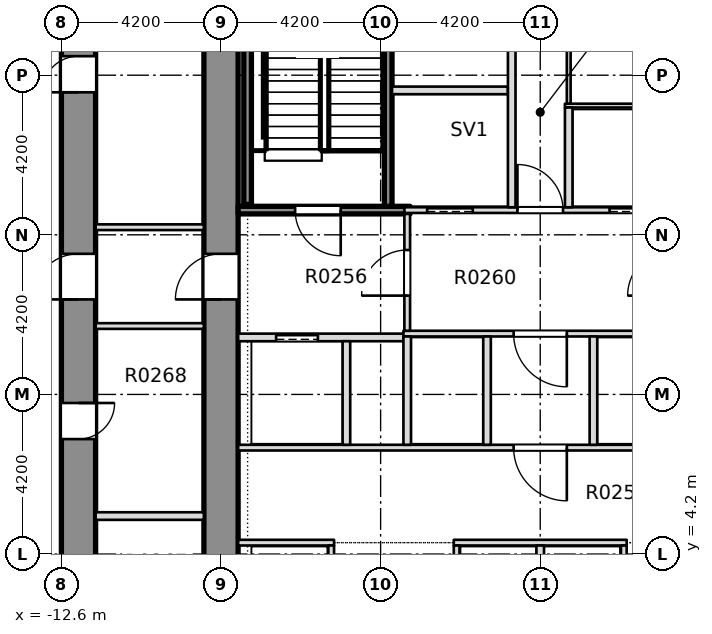
"""IFC4 building model, lengths in metres.
Left out: names, types, materials, properties, quantities, classifications, styles, units other than length and angle.
Written with IfcOpenShell. Run it as: python <this file> out.ifc"""

import sys

from ifc_helpers import new_model, si_unit, direction, frame, frame_2d, origin, place, context, subcontext, project, spatial, rectangle, extrude, element, fill, save


model = new_model("IFC4")
c1 = context("Model", 3, precision=1e-05, world=origin(), true_north=direction((0.0, 1.0)))
c2 = subcontext(c1, "Body", "Model", "MODEL_VIEW")
j1 = project(units=[si_unit("LENGTHUNIT", "METRE"), si_unit("PLANEANGLEUNIT", "RADIAN")], contexts=[c1])
p1 = place(None, origin())
s1 = spatial("IfcSite", under=j1, at=p1, CompositionType="ELEMENT")
p2 = place(p1, origin())
s2 = spatial("IfcBuilding", under=s1, at=p2, CompositionType="ELEMENT")
p3 = place(p2, frame((0.0, 0.0, 12.5)))
s3 = spatial("IfcBuildingStorey", under=s2, at=p3, CompositionType="ELEMENT", Elevation=12.5)
p4 = place(p3, frame((-12.15, -8.4, -0.4), z_axis=(0.0, 0.0, 1.0), x_axis=(0.0, 1.0, 0.0)))
e1 = element("IfcWall", 1, at=p4, inside=s3, PredefinedType="SHEAR", context=c2, shape_type="SweptSolid", body=[
    extrude(rectangle(XDim=30.15, YDim=0.9, at=frame_2d((15.075, 0.0))), origin(), (0.0, 0.0, 1.0), 7.5),
])
p5 = place(p4, frame((2.925, 0.0, 0.4)))
e2 = element("IfcOpeningElement", 2, at=p5, cuts=e1, PredefinedType="OPENING", context=c2, shape_type="SweptSolid", body=[
    extrude(rectangle(XDim=0.95, YDim=2.1, at=frame_2d((0.475, 1.05))), frame((0.0, 0.46, 0.0), z_axis=(0.0, -1.0, 0.0), x_axis=(1.0, 0.0, 0.0)), (0.0, 0.0, 1.0), 0.92),
])
p6 = place(p4, frame((7.025, 0.0, 0.4)))
e3 = element("IfcOpeningElement", 3, at=p6, cuts=e1, PredefinedType="OPENING", context=c2, shape_type="SweptSolid", body=[
    extrude(rectangle(XDim=0.95, YDim=2.1, at=frame_2d((0.475, 1.05))), frame((0.0, 0.46, 0.0), z_axis=(0.0, -1.0, 0.0), x_axis=(1.0, 0.0, 0.0)), (0.0, 0.0, 1.0), 0.92),
])
p7 = place(p4, frame((10.875, 0.0, 0.4)))
e4 = element("IfcOpeningElement", 4, at=p7, cuts=e1, PredefinedType="OPENING", context=c2, shape_type="SweptSolid", body=[
    extrude(rectangle(XDim=0.95, YDim=2.1, at=frame_2d((0.475, 1.05))), frame((0.0, 0.46, 0.0), z_axis=(0.0, -1.0, 0.0), x_axis=(1.0, 0.0, 0.0)), (0.0, 0.0, 1.0), 0.92),
])
p8 = place(p4, frame((15.625, 0.0, 0.4)))
e5 = element("IfcOpeningElement", 5, at=p8, cuts=e1, PredefinedType="OPENING", context=c2, shape_type="SweptSolid", body=[
    extrude(rectangle(XDim=0.95, YDim=2.1, at=frame_2d((0.475, 1.05))), frame((0.0, 0.46, 0.0), z_axis=(0.0, -1.0, 0.0), x_axis=(1.0, 0.0, 0.0)), (0.0, 0.0, 1.0), 0.92),
])
p9 = place(p4, frame((24.75, 0.0, 0.4)))
e6 = element("IfcOpeningElement", 6, at=p9, cuts=e1, PredefinedType="OPENING", context=c2, shape_type="SweptSolid", body=[
    extrude(rectangle(XDim=0.95, YDim=2.1, at=frame_2d((0.475, 1.05))), frame((0.0, 0.46, 0.0), z_axis=(0.0, -1.0, 0.0), x_axis=(1.0, 0.0, 0.0)), (0.0, 0.0, 1.0), 0.92),
])
p10 = place(p4, frame((19.3, 0.0, 0.4)))
e7 = element("IfcOpeningElement", 7, at=p10, cuts=e1, PredefinedType="OPENING", context=c2, shape_type="SweptSolid", body=[
    extrude(rectangle(XDim=1.2, YDim=2.1, at=frame_2d((0.6, 1.05))), frame((0.0, 0.46, 0.0), z_axis=(0.0, -1.0, 0.0), x_axis=(1.0, 0.0, 0.0)), (0.0, 0.0, 1.0), 0.92),
])
p11 = place(p3, frame((-8.4, -7.5, -0.4), z_axis=(0.0, 0.0, 1.0), x_axis=(0.0, 1.0, 0.0)))
e8 = element("IfcWall", 8, at=p11, inside=s3, PredefinedType="SHEAR", context=c2, shape_type="SweptSolid", body=[
    extrude(rectangle(XDim=28.35, YDim=0.9, at=frame_2d((14.175, 0.0))), origin(), (0.0, 0.0, 1.0), 7.5),
])
p12 = place(p11, frame((18.4, 0.0, 0.4)))
e9 = element("IfcOpeningElement", 9, at=p12, cuts=e8, PredefinedType="OPENING", context=c2, shape_type="SweptSolid", body=[
    extrude(rectangle(XDim=1.2, YDim=2.1, at=frame_2d((0.6, 1.05))), frame((0.0, 0.46, 0.0), z_axis=(0.0, -1.0, 0.0), x_axis=(1.0, 0.0, 0.0)), (0.0, 0.0, 1.0), 0.92),
])
p13 = place(p3, frame((-7.949, 4.5, 0.0), z_axis=(0.0, 0.0, 1.0), x_axis=(1.0, 0.0, 0.0)))
e10 = element("IfcWall", 10, at=p13, inside=s3, PredefinedType="PARTITIONING", context=c2, shape_type="SweptSolid", body=[
    extrude(rectangle(XDim=2.524, YDim=0.15, at=frame_2d((1.262, 0.0))), origin(), (0.0, 0.0, 1.0), 7.1),
])
p14 = place(p3, frame((-2.275, 4.5, 0.0), z_axis=(0.0, 0.0, 1.0), x_axis=(1.0, 0.0, 0.0)))
e11 = element("IfcWall", 11, at=p14, inside=s3, PredefinedType="PARTITIONING", context=c2, shape_type="SweptSolid", body=[
    extrude(rectangle(XDim=4.55, YDim=0.15, at=frame_2d((2.275, 0.0))), origin(), (0.0, 0.0, 1.0), 7.1),
])
p15 = place(p3, frame((-7.949, 7.0, 0.0), z_axis=(0.0, 0.0, 1.0), x_axis=(1.0, 0.0, 0.0)))
e12 = element("IfcWall", 12, at=p15, inside=s3, PredefinedType="PARTITIONING", context=c2, shape_type="SweptSolid", body=[
    extrude(rectangle(XDim=15.898, YDim=0.15, at=frame_2d((7.949, 0.0))), origin(), (0.0, 0.0, 1.0), 7.1),
])
p16 = place(p15, frame((7.249, 0.0, 0.0)))
e13 = element("IfcOpeningElement", 13, at=p16, cuts=e12, PredefinedType="OPENING", context=c2, shape_type="SweptSolid", body=[
    extrude(rectangle(XDim=1.4, YDim=2.1, at=frame_2d((0.7, 1.05))), frame((0.0, 0.085, 0.0), z_axis=(0.0, -1.0, 0.0), x_axis=(1.0, 0.0, 0.0)), (0.0, 0.0, 1.0), 0.17),
])
p17 = place(p3, frame((-7.949, 9.9, 0.0), z_axis=(0.0, 0.0, 1.0), x_axis=(1.0, 0.0, 0.0)))
e14 = element("IfcWall", 14, at=p17, inside=s3, PredefinedType="PARTITIONING", context=c2, shape_type="SweptSolid", body=[
    extrude(rectangle(XDim=4.349, YDim=0.2, at=frame_2d((2.174, 0.0))), origin(), (0.0, 0.0, 1.0), 7.1),
])
p18 = place(p17, frame((0.999, 0.0, 0.0)))
e15 = element("IfcOpeningElement", 15, at=p18, cuts=e14, PredefinedType="OPENING", context=c2, shape_type="SweptSolid", body=[
    extrude(rectangle(XDim=1.1, YDim=2.1, at=frame_2d((0.55, 1.05))), frame((0.0, 0.11, 0.0), z_axis=(0.0, -1.0, 0.0), x_axis=(1.0, 0.0, 0.0)), (0.0, 0.0, 1.0), 0.22),
])
p19 = place(p3, frame((-3.6, 10.0, 0.0), z_axis=(0.0, 0.0, 1.0), x_axis=(1.0, 0.0, 0.0)))
e16 = element("IfcWall", 16, at=p19, inside=s3, PredefinedType="PARTITIONING", context=c2, shape_type="SweptSolid", body=[
    extrude(rectangle(XDim=7.2, YDim=0.15, at=frame_2d((3.6, 0.0))), origin(), (0.0, 0.0, 1.0), 7.1),
])
p20 = place(p19, frame((2.9, 0.0, 0.0)))
e17 = element("IfcOpeningElement", 17, at=p20, cuts=e16, PredefinedType="OPENING", context=c2, shape_type="SweptSolid", body=[
    extrude(rectangle(XDim=1.4, YDim=2.1, at=frame_2d((0.7, 1.05))), frame((0.0, 0.085, 0.0), z_axis=(0.0, -1.0, 0.0), x_axis=(1.0, 0.0, 0.0)), (0.0, 0.0, 1.0), 0.17),
])
p21 = place(p3, frame((-7.949, 13.25, 0.0), z_axis=(0.0, 0.0, 1.0), x_axis=(1.0, 0.0, 0.0)))
e18 = element("IfcWall", 18, at=p21, inside=s3, PredefinedType="SOLIDWALL", context=c2, shape_type="SweptSolid", body=[
    extrude(rectangle(XDim=4.524, YDim=0.2, at=frame_2d((2.262, 0.0))), origin(), (0.0, 0.0, 1.0), 7.1),
])
p22 = place(p21, frame((1.499, 0.0, 0.0)))
e19 = element("IfcOpeningElement", 19, at=p22, cuts=e18, PredefinedType="OPENING", context=c2, shape_type="SweptSolid", body=[
    extrude(rectangle(XDim=1.2, YDim=2.1, at=frame_2d((0.6, 1.05))), frame((0.0, 0.11, 0.0), z_axis=(0.0, -1.0, 0.0), x_axis=(1.0, 0.0, 0.0)), (0.0, 0.0, 1.0), 0.22),
])
p23 = place(p3, frame((-3.575, 13.25, 0.0), z_axis=(0.0, 0.0, 1.0), x_axis=(1.0, 0.0, 0.0)))
e20 = element("IfcWall", 20, at=p23, inside=s3, PredefinedType="PARTITIONING", context=c2, shape_type="SweptSolid", body=[
    extrude(rectangle(XDim=7.15, YDim=0.15, at=frame_2d((3.575, 0.0))), origin(), (0.0, 0.0, 1.0), 7.1),
])
p24 = place(p23, frame((0.6, 0.0, 0.0)))
e21 = element("IfcOpeningElement", 21, at=p24, cuts=e20, PredefinedType="OPENING", context=c2, shape_type="SweptSolid", body=[
    extrude(rectangle(XDim=1.2, YDim=2.1, at=frame_2d((0.6, 1.05))), frame((0.0, 0.085, 0.0), z_axis=(0.0, -1.0, 0.0), x_axis=(1.0, 0.0, 0.0)), (0.0, 0.0, 1.0), 0.17),
])
p25 = place(p23, frame((5.4, 0.0, 0.0)))
e22 = element("IfcOpeningElement", 22, at=p25, cuts=e20, PredefinedType="OPENING", context=c2, shape_type="SweptSolid", body=[
    extrude(rectangle(XDim=1.1, YDim=2.1, at=frame_2d((0.55, 1.05))), frame((0.0, 0.085, 0.0), z_axis=(0.0, -1.0, 0.0), x_axis=(1.0, 0.0, 0.0)), (0.0, 0.0, 1.0), 0.17),
])
p26 = place(p23, frame((2.975, 0.0, 0.0)))
e23 = element("IfcOpeningElement", 23, at=p26, cuts=e20, PredefinedType="OPENING", context=c2, shape_type="SweptSolid", body=[
    extrude(rectangle(XDim=1.2, YDim=2.1, at=frame_2d((0.6, 1.05))), frame((0.0, 0.085, 0.0), z_axis=(0.0, -1.0, 0.0), x_axis=(1.0, 0.0, 0.0)), (0.0, 0.0, 1.0), 0.17),
])
p27 = place(p3, frame((0.65, 16.0, 0.0), z_axis=(0.0, 0.0, 1.0), x_axis=(1.0, 0.0, 0.0)))
e24 = element("IfcWall", 24, at=p27, inside=s3, PredefinedType="PARTITIONING", context=c2, shape_type="SweptSolid", body=[
    extrude(rectangle(XDim=3.45, YDim=0.1, at=frame_2d((1.725, 0.0))), origin(), (0.0, 0.0, 1.0), 7.1),
])
p28 = place(p3, frame((-3.9, 16.4, 0.0), z_axis=(0.0, 0.0, 1.0), x_axis=(1.0, 0.0, 0.0)))
e25 = element("IfcWall", 25, at=p28, inside=s3, PredefinedType="PARTITIONING", context=c2, shape_type="SweptSolid", body=[
    extrude(rectangle(XDim=3.05, YDim=0.2, at=frame_2d((1.525, 0.0))), origin(), (0.0, 0.0, 1.0), 7.1),
])
p29 = place(p3, frame((-5.5, -7.499, 0.0), z_axis=(0.0, 0.0, 1.0), x_axis=(0.0, 1.0, 0.0)))
e26 = element("IfcWall", 26, at=p29, inside=s3, PredefinedType="PARTITIONING", context=c2, shape_type="SweptSolid", body=[
    extrude(rectangle(XDim=11.924, YDim=0.15, at=frame_2d((5.962, 0.0))), origin(), (0.0, 0.0, 1.0), 7.1),
])
p30 = place(p29, frame((0.949, 0.0, 0.0)))
e27 = element("IfcOpeningElement", 27, at=p30, cuts=e26, PredefinedType="OPENING", context=c2, shape_type="SweptSolid", body=[
    extrude(rectangle(XDim=1.1, YDim=2.1, at=frame_2d((0.55, 1.05))), frame((0.0, 0.085, 0.0), z_axis=(0.0, -1.0, 0.0), x_axis=(1.0, 0.0, 0.0)), (0.0, 0.0, 1.0), 0.17),
])
p31 = place(p29, frame((3.949, 0.0, 0.0)))
e28 = element("IfcOpeningElement", 28, at=p31, cuts=e26, PredefinedType="OPENING", context=c2, shape_type="SweptSolid", body=[
    extrude(rectangle(XDim=1.1, YDim=2.1, at=frame_2d((0.55, 1.05))), frame((0.0, 0.085, 0.0), z_axis=(0.0, -1.0, 0.0), x_axis=(1.0, 0.0, 0.0)), (0.0, 0.0, 1.0), 0.17),
])
p32 = place(p29, frame((6.949, 0.0, 0.0)))
e29 = element("IfcOpeningElement", 29, at=p32, cuts=e26, PredefinedType="OPENING", context=c2, shape_type="SweptSolid", body=[
    extrude(rectangle(XDim=1.1, YDim=2.1, at=frame_2d((0.55, 1.05))), frame((0.0, 0.085, 0.0), z_axis=(0.0, -1.0, 0.0), x_axis=(1.0, 0.0, 0.0)), (0.0, 0.0, 1.0), 0.17),
])
p33 = place(p29, frame((9.949, 0.0, 0.0)))
e30 = element("IfcOpeningElement", 30, at=p33, cuts=e26, PredefinedType="OPENING", context=c2, shape_type="SweptSolid", body=[
    extrude(rectangle(XDim=1.1, YDim=2.1, at=frame_2d((0.55, 1.05))), frame((0.0, 0.085, 0.0), z_axis=(0.0, -1.0, 0.0), x_axis=(1.0, 0.0, 0.0)), (0.0, 0.0, 1.0), 0.17),
])
p34 = place(p3, frame((-5.1, 7.075, 0.0), z_axis=(0.0, 0.0, 1.0), x_axis=(0.0, 1.0, 0.0)))
e31 = element("IfcWall", 31, at=p34, inside=s3, PredefinedType="PARTITIONING", context=c2, shape_type="SweptSolid", body=[
    extrude(rectangle(XDim=2.725, YDim=0.2, at=frame_2d((1.363, 0.0))), origin(), (0.0, 0.0, 1.0), 7.1),
])
p35 = place(p3, frame((-4.0, 13.35, 0.0), z_axis=(0.0, 0.0, 1.0), x_axis=(0.0, 1.0, 0.0)))
e32 = element("IfcWall", 32, at=p35, inside=s3, PredefinedType="SOLIDWALL", context=c2, shape_type="SweptSolid", body=[
    extrude(rectangle(XDim=7.499, YDim=0.2, at=frame_2d((3.75, 0.0))), origin(), (0.0, 0.0, 1.0), 7.1),
])
p36 = place(p3, frame((-3.5, 7.075, 0.0), z_axis=(0.0, 0.0, 1.0), x_axis=(0.0, 1.0, 0.0)))
e33 = element("IfcWall", 33, at=p36, inside=s3, PredefinedType="PARTITIONING", context=c2, shape_type="SweptSolid", body=[
    extrude(rectangle(XDim=2.85, YDim=0.2, at=frame_2d((1.425, 0.0))), origin(), (0.0, 0.0, 1.0), 7.1),
])
p37 = place(p3, frame((-3.5, 10.075, 0.0), z_axis=(0.0, 0.0, 1.0), x_axis=(0.0, 1.0, 0.0)))
e34 = element("IfcWall", 34, at=p37, inside=s3, PredefinedType="PARTITIONING", context=c2, shape_type="SweptSolid", body=[
    extrude(rectangle(XDim=3.075, YDim=0.15, at=frame_2d((1.538, 0.0))), origin(), (0.0, 0.0, 1.0), 7.1),
])
p38 = place(p37, frame((0.925, 0.0, 0.0)))
e35 = element("IfcOpeningElement", 35, at=p38, cuts=e34, PredefinedType="OPENING", context=c2, shape_type="SweptSolid", body=[
    extrude(rectangle(XDim=1.2, YDim=2.1, at=frame_2d((0.6, 1.05))), frame((0.0, 0.085, 0.0), z_axis=(0.0, -1.0, 0.0), x_axis=(1.0, 0.0, 0.0)), (0.0, 0.0, 1.0), 0.17),
])
p39 = place(p3, frame((-2.2, -7.499, 0.0), z_axis=(0.0, 0.0, 1.0), x_axis=(0.0, 1.0, 0.0)))
e36 = element("IfcWall", 36, at=p39, inside=s3, PredefinedType="PARTITIONING", context=c2, shape_type="SweptSolid", body=[
    extrude(rectangle(XDim=11.924, YDim=0.15, at=frame_2d((5.962, 0.0))), origin(), (0.0, 0.0, 1.0), 7.1),
])
p40 = place(p39, frame((0.949, 0.0, 0.0)))
e37 = element("IfcOpeningElement", 37, at=p40, cuts=e36, PredefinedType="OPENING", context=c2, shape_type="SweptSolid", body=[
    extrude(rectangle(XDim=1.1, YDim=2.1, at=frame_2d((0.55, 1.05))), frame((0.0, 0.085, 0.0), z_axis=(0.0, -1.0, 0.0), x_axis=(1.0, 0.0, 0.0)), (0.0, 0.0, 1.0), 0.17),
])
p41 = place(p39, frame((3.949, 0.0, 0.0)))
e38 = element("IfcOpeningElement", 38, at=p41, cuts=e36, PredefinedType="OPENING", context=c2, shape_type="SweptSolid", body=[
    extrude(rectangle(XDim=1.1, YDim=2.1, at=frame_2d((0.55, 1.05))), frame((0.0, 0.085, 0.0), z_axis=(0.0, -1.0, 0.0), x_axis=(1.0, 0.0, 0.0)), (0.0, 0.0, 1.0), 0.17),
])
p42 = place(p39, frame((6.949, 0.0, 0.0)))
e39 = element("IfcOpeningElement", 39, at=p42, cuts=e36, PredefinedType="OPENING", context=c2, shape_type="SweptSolid", body=[
    extrude(rectangle(XDim=1.1, YDim=2.1, at=frame_2d((0.55, 1.05))), frame((0.0, 0.085, 0.0), z_axis=(0.0, -1.0, 0.0), x_axis=(1.0, 0.0, 0.0)), (0.0, 0.0, 1.0), 0.17),
])
p43 = place(p39, frame((9.949, 0.0, 0.0)))
e40 = element("IfcOpeningElement", 40, at=p43, cuts=e36, PredefinedType="OPENING", context=c2, shape_type="SweptSolid", body=[
    extrude(rectangle(XDim=1.1, YDim=2.1, at=frame_2d((0.55, 1.05))), frame((0.0, 0.085, 0.0), z_axis=(0.0, -1.0, 0.0), x_axis=(1.0, 0.0, 0.0)), (0.0, 0.0, 1.0), 0.17),
])
p44 = place(p3, frame((-1.4, 7.075, 0.0), z_axis=(0.0, 0.0, 1.0), x_axis=(0.0, 1.0, 0.0)))
e41 = element("IfcWall", 41, at=p44, inside=s3, PredefinedType="PARTITIONING", context=c2, shape_type="SweptSolid", body=[
    extrude(rectangle(XDim=2.85, YDim=0.2, at=frame_2d((1.425, 0.0))), origin(), (0.0, 0.0, 1.0), 7.1),
])
p45 = place(p3, frame((-0.75, 13.325, 0.0), z_axis=(0.0, 0.0, 1.0), x_axis=(0.0, 1.0, 0.0)))
e42 = element("IfcWall", 42, at=p45, inside=s3, PredefinedType="PARTITIONING", context=c2, shape_type="SweptSolid", body=[
    extrude(rectangle(XDim=7.524, YDim=0.2, at=frame_2d((3.762, 0.0))), origin(), (0.0, 0.0, 1.0), 7.1),
])
p46 = place(p45, frame((4.8, 0.0, 0.0)))
e43 = element("IfcOpeningElement", 43, at=p46, cuts=e42, PredefinedType="OPENING", context=c2, shape_type="SweptSolid", body=[
    extrude(rectangle(XDim=0.95, YDim=2.1, at=frame_2d((0.475, 1.05))), frame((0.0, 0.11, 0.0), z_axis=(0.0, -1.0, 0.0), x_axis=(1.0, 0.0, 0.0)), (0.0, 0.0, 1.0), 0.22),
])
p47 = place(p3, frame((0.0, -7.499, 0.0), z_axis=(0.0, 0.0, 1.0), x_axis=(0.0, 1.0, 0.0)))
e44 = element("IfcWall", 44, at=p47, inside=s3, PredefinedType="PARTITIONING", context=c2, shape_type="SweptSolid", body=[
    extrude(rectangle(XDim=11.924, YDim=0.2, at=frame_2d((5.962, 0.0))), origin(), (0.0, 0.0, 1.0), 7.1),
])
p48 = place(p3, frame((0.75, 13.325, 0.0), z_axis=(0.0, 0.0, 1.0), x_axis=(0.0, 1.0, 0.0)))
e45 = element("IfcWall", 45, at=p48, inside=s3, PredefinedType="PARTITIONING", context=c2, shape_type="SweptSolid", body=[
    extrude(rectangle(XDim=2.625, YDim=0.2, at=frame_2d((1.312, 0.0))), origin(), (0.0, 0.0, 1.0), 7.1),
])
p49 = place(p3, frame((0.75, 16.05, 0.0), z_axis=(0.0, 0.0, 1.0), x_axis=(0.0, 1.0, 0.0)))
e46 = element("IfcWall", 46, at=p49, inside=s3, PredefinedType="PARTITIONING", context=c2, shape_type="SweptSolid", body=[
    extrude(rectangle(XDim=4.799, YDim=0.1, at=frame_2d((2.399, 0.0))), origin(), (0.0, 0.0, 1.0), 7.1),
])
p50 = place(p49, frame((1.875, 0.0, 0.0)))
e47 = element("IfcOpeningElement", 47, at=p50, cuts=e46, PredefinedType="OPENING", context=c2, shape_type="SweptSolid", body=[
    extrude(rectangle(XDim=0.95, YDim=2.1, at=frame_2d((0.475, 1.05))), frame((0.0, 0.06, 0.0), z_axis=(0.0, -1.0, 0.0), x_axis=(1.0, 0.0, 0.0)), (0.0, 0.0, 1.0), 0.12),
])
p51 = place(p3, frame((1.4, 7.075, 0.0), z_axis=(0.0, 0.0, 1.0), x_axis=(0.0, 1.0, 0.0)))
e48 = element("IfcWall", 48, at=p51, inside=s3, PredefinedType="PARTITIONING", context=c2, shape_type="SweptSolid", body=[
    extrude(rectangle(XDim=2.85, YDim=0.2, at=frame_2d((1.425, 0.0))), origin(), (0.0, 0.0, 1.0), 7.1),
])
p52 = place(p3, frame((2.2, -7.499, 0.0), z_axis=(0.0, 0.0, 1.0), x_axis=(0.0, 1.0, 0.0)))
e49 = element("IfcWall", 49, at=p52, inside=s3, PredefinedType="PARTITIONING", context=c2, shape_type="SweptSolid", body=[
    extrude(rectangle(XDim=11.924, YDim=0.15, at=frame_2d((5.962, 0.0))), origin(), (0.0, 0.0, 1.0), 7.1),
])
p53 = place(p3, frame((-11.699, 5.2, 0.0), z_axis=(0.0, 0.0, 1.0), x_axis=(1.0, 0.0, 0.0)))
e50 = element("IfcWall", 50, at=p53, inside=s3, PredefinedType="PARTITIONING", context=c2, shape_type="SweptSolid", body=[
    extrude(rectangle(XDim=2.848, YDim=0.2, at=frame_2d((1.424, 0.0))), origin(), (0.0, 0.0, 1.0), 7.1),
])
for number, where, z_axis, x_axis in (
    (51, (-11.699, 10.2, 0.0), (0.0, 0.0, 1.0), (1.0, 0.0, 0.0)),
    (52, (-11.699, 12.8, 0.0), (0.0, 0.0, 1.0), (1.0, 0.0, 0.0)),
):
    element("IfcWall", number, at=place(p3, frame(where, z_axis=z_axis, x_axis=x_axis)), inside=s3, PredefinedType="PARTITIONING", context=c2, shape_type="SweptSolid", body=[
        extrude(rectangle(XDim=2.848, YDim=0.15, at=frame_2d((1.424, 0.0))), origin(), (0.0, 0.0, 1.0), 7.1),
    ])
p54 = place(p3, frame((-7.7, 13.4, 0.0), z_axis=(0.0, 0.0, 1.0), x_axis=(0.0, 1.0, 0.0)))
e53 = element("IfcWall", 53, at=p54, inside=s3, PredefinedType="SOLIDWALL", context=c2, shape_type="SweptSolid", body=[
    extrude(rectangle(XDim=7.4, YDim=0.2, at=frame_2d((3.7, 0.0))), origin(), (0.0, 0.0, 1.0), 7.1),
])
p55 = place(p22, origin())
e54 = element("IfcDoor", 54, at=p55, inside=s3, OperationType="SINGLE_SWING_LEFT", PredefinedType="DOOR", context=c2, shape_type="SweptSolid", body=[
    extrude(rectangle(XDim=1.2, YDim=2.1, at=frame_2d((0.6, 1.05))), frame((0.0, 0.025, 0.0), z_axis=(0.0, -1.0, 0.0), x_axis=(1.0, 0.0, 0.0)), (0.0, 0.0, 1.0), 0.05),
])
fill(e19, e54)
p56 = place(p18, origin())
e55 = element("IfcDoor", 55, at=p56, inside=s3, OperationType="SLIDING_TO_RIGHT", PredefinedType="DOOR", context=c2, shape_type="SweptSolid", body=[
    extrude(rectangle(XDim=1.1, YDim=2.1, at=frame_2d((0.55, 1.05))), frame((0.0, 0.025, 0.0), z_axis=(0.0, -1.0, 0.0), x_axis=(1.0, 0.0, 0.0)), (0.0, 0.0, 1.0), 0.05),
])
fill(e15, e55)
p57 = place(p16, origin())
e56 = element("IfcDoor", 56, at=p57, inside=s3, OperationType="SINGLE_SWING_RIGHT", PredefinedType="DOOR", context=c2, shape_type="SweptSolid", body=[
    extrude(rectangle(XDim=1.4, YDim=2.1, at=frame_2d((0.7, 1.05))), frame((0.0, 0.025, 0.0), z_axis=(0.0, -1.0, 0.0), x_axis=(1.0, 0.0, 0.0)), (0.0, 0.0, 1.0), 0.05),
])
fill(e13, e56)
p58 = place(p20, origin())
e57 = element("IfcDoor", 57, at=p58, inside=s3, OperationType="SINGLE_SWING_RIGHT", PredefinedType="DOOR", context=c2, shape_type="SweptSolid", body=[
    extrude(rectangle(XDim=1.4, YDim=2.1, at=frame_2d((0.7, 1.05))), frame((0.0, 0.025, 0.0), z_axis=(0.0, -1.0, 0.0), x_axis=(1.0, 0.0, 0.0)), (0.0, 0.0, 1.0), 0.05),
])
fill(e17, e57)
p59 = place(p24, origin())
e58 = element("IfcDoor", 58, at=p59, inside=s3, OperationType="SLIDING_TO_RIGHT", PredefinedType="DOOR", context=c2, shape_type="SweptSolid", body=[
    extrude(rectangle(XDim=1.2, YDim=2.1, at=frame_2d((0.6, 1.05))), frame((0.0, 0.025, 0.0), z_axis=(0.0, -1.0, 0.0), x_axis=(1.0, 0.0, 0.0)), (0.0, 0.0, 1.0), 0.05),
])
fill(e21, e58)
p60 = place(p25, origin())
e59 = element("IfcDoor", 59, at=p60, inside=s3, OperationType="SLIDING_TO_LEFT", PredefinedType="DOOR", context=c2, shape_type="SweptSolid", body=[
    extrude(rectangle(XDim=1.1, YDim=2.1, at=frame_2d((0.55, 1.05))), frame((0.0, 0.025, 0.0), z_axis=(0.0, -1.0, 0.0), x_axis=(1.0, 0.0, 0.0)), (0.0, 0.0, 1.0), 0.05),
])
fill(e22, e59)
p61 = place(p26, origin())
e60 = element("IfcDoor", 60, at=p61, inside=s3, OperationType="SINGLE_SWING_RIGHT", PredefinedType="DOOR", context=c2, shape_type="SweptSolid", body=[
    extrude(rectangle(XDim=1.2, YDim=2.1, at=frame_2d((0.6, 1.05))), frame((0.0, 0.025, 0.0), z_axis=(0.0, -1.0, 0.0), x_axis=(1.0, 0.0, 0.0)), (0.0, 0.0, 1.0), 0.05),
])
fill(e23, e60)
p62 = place(p38, origin())
e61 = element("IfcDoor", 61, at=p62, inside=s3, OperationType="SINGLE_SWING_RIGHT", PredefinedType="DOOR", context=c2, shape_type="SweptSolid", body=[
    extrude(rectangle(XDim=1.2, YDim=2.1, at=frame_2d((0.6, 1.05))), frame((0.0, 0.025, 0.0), z_axis=(0.0, -1.0, 0.0), x_axis=(1.0, 0.0, 0.0)), (0.0, 0.0, 1.0), 0.05),
])
fill(e35, e61)
p63 = place(p8, origin())
e62 = element("IfcDoor", 62, at=p63, inside=s3, OperationType="SINGLE_SWING_LEFT", PredefinedType="DOOR", context=c2, shape_type="SweptSolid", body=[
    extrude(rectangle(XDim=0.95, YDim=2.1, at=frame_2d((0.475, 1.05))), frame((0.0, 0.025, 0.0), z_axis=(0.0, -1.0, 0.0), x_axis=(1.0, 0.0, 0.0)), (0.0, 0.0, 1.0), 0.05),
])
fill(e5, e62)
p64 = place(p9, origin())
e63 = element("IfcDoor", 63, at=p64, inside=s3, OperationType="SINGLE_SWING_LEFT", PredefinedType="DOOR", context=c2, shape_type="SweptSolid", body=[
    extrude(rectangle(XDim=0.95, YDim=2.1, at=frame_2d((0.475, 1.05))), frame((0.0, 0.025, 0.0), z_axis=(0.0, -1.0, 0.0), x_axis=(1.0, 0.0, 0.0)), (0.0, 0.0, 1.0), 0.05),
])
fill(e6, e63)
p65 = place(p10, origin())
e64 = element("IfcDoor", 64, at=p65, inside=s3, OperationType="SINGLE_SWING_LEFT", PredefinedType="DOOR", context=c2, shape_type="SweptSolid", body=[
    extrude(rectangle(XDim=1.2, YDim=2.1, at=frame_2d((0.6, 1.05))), frame((0.0, 0.025, 0.0), z_axis=(0.0, -1.0, 0.0), x_axis=(1.0, 0.0, 0.0)), (0.0, 0.0, 1.0), 0.05),
])
fill(e7, e64)
p66 = place(p12, origin())
e65 = element("IfcDoor", 65, at=p66, inside=s3, OperationType="SINGLE_SWING_LEFT", PredefinedType="DOOR", context=c2, shape_type="SweptSolid", body=[
    extrude(rectangle(XDim=1.2, YDim=2.1, at=frame_2d((0.6, 1.05))), frame((0.0, 0.025, 0.0), z_axis=(0.0, -1.0, 0.0), x_axis=(1.0, 0.0, 0.0)), (0.0, 0.0, 1.0), 0.05),
])
fill(e9, e65)
save(model, sys.argv[1])
